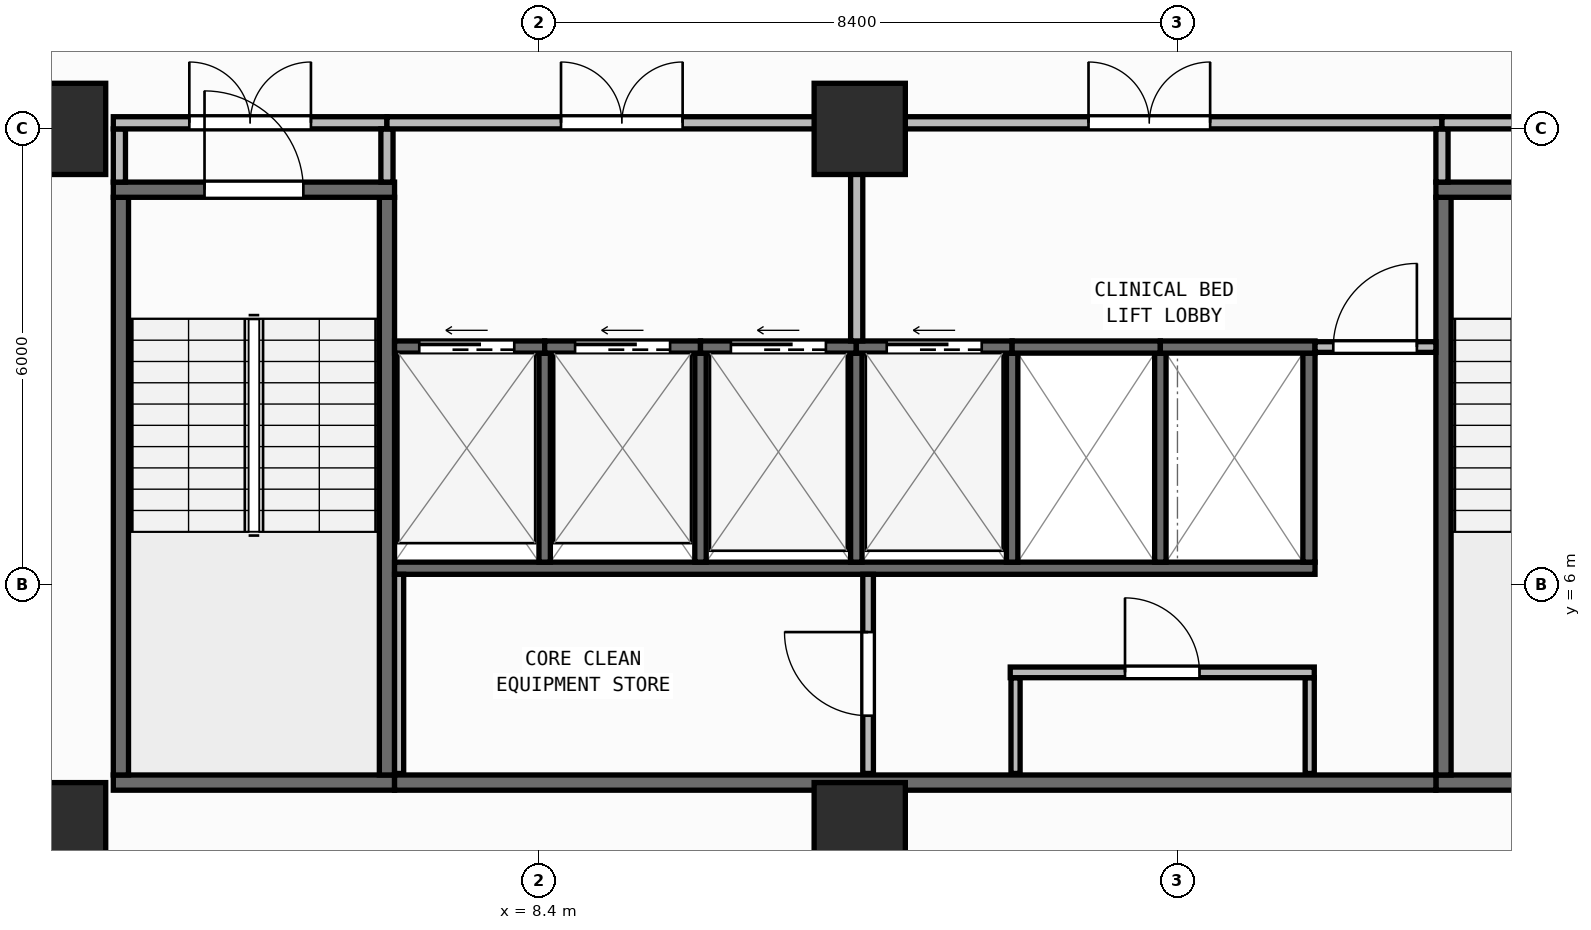
"""IFC4 building model, lengths in metres.
Left out: names, types, materials, properties, quantities, classifications, styles, units other than length and angle.
Written with IfcOpenShell. Run it as: python <this file> out.ifc"""

import sys

from ifc_helpers import new_model, si_unit, direction, frame, frame_2d, origin, origin_2d, place, context, subcontext, project, spatial, rectangle, extrude, element, fill, save


model = new_model("IFC4")
c1 = context("Model", 3, precision=1e-05, world=origin(), true_north=direction((0.0, 1.0)))
c2 = subcontext(c1, "Body", "Model", "MODEL_VIEW")
j1 = project(units=[si_unit("LENGTHUNIT", "METRE"), si_unit("PLANEANGLEUNIT", "RADIAN")], contexts=[c1])
p1 = place(None, origin())
s1 = spatial("IfcSite", under=j1, at=p1, CompositionType="ELEMENT")
p2 = place(p1, origin())
s2 = spatial("IfcBuilding", under=s1, at=p2, CompositionType="ELEMENT")
p3 = place(p2, frame((0.0, 0.0, 146.8)))
s3 = spatial("IfcBuildingStorey", under=s2, at=p3, CompositionType="ELEMENT", Elevation=146.8)
for number, where, z_axis, x_axis in (
    (1, (2.1, 2.8, 0.0), (0.0, 0.0, 1.0), (1.0, 0.0, 0.0)),
    (2, (12.62, 2.8, 0.0), (0.0, 0.0, 1.0), (1.0, 0.0, 0.0)),
    (3, (2.1, 12.0, 0.0), (0.0, 0.0, 1.0), (1.0, 0.0, 0.0)),
    (4, (12.62, 12.0, 0.0), (0.0, 0.0, 1.0), (1.0, 0.0, 0.0)),
):
    element("IfcColumn", number, at=place(p3, frame(where, z_axis=z_axis, x_axis=x_axis)), inside=s3, PredefinedType="COLUMN", context=c2, shape_type="SweptSolid", body=[
        extrude(rectangle(XDim=1.2, YDim=1.2, at=origin_2d()), origin(), (0.0, 0.0, 1.0), 3.95),
    ])
p4 = place(p3, frame((2.76, 0.173, 0.0), z_axis=(0.0, 0.0, 1.0), x_axis=(0.996857931723, 0.079210251617, 0.0)))
e5 = element("IfcWall", 5, at=p4, inside=s3, PredefinedType="STANDARD", context=c2, shape_type="SweptSolid", body=[
    extrude(rectangle(XDim=51.442, YDim=0.26, at=frame_2d((25.721, 0.0))), origin(), (0.0, 0.0, 1.0), 3.71),
])
p5 = place(p4, frame((24.521, 0.0, 0.9)))
e6 = element("IfcOpeningElement", 6, at=p5, cuts=e5, PredefinedType="OPENING", context=c2, shape_type="SweptSolid", body=[
    extrude(rectangle(XDim=2.4, YDim=1.65, at=frame_2d((1.2, 0.825))), frame((0.0, 0.14, 0.0), z_axis=(0.0, -1.0, 0.0), x_axis=(1.0, 0.0, 0.0)), (0.0, 0.0, 1.0), 0.28),
])
p6 = place(p3, frame((2.8, 3.4, 0.0), z_axis=(0.0, 0.0, 1.0), x_axis=(1.0, 0.0, 0.0)))
e7 = element("IfcWall", 7, at=p6, inside=s3, PredefinedType="SHEAR", context=c2, shape_type="SweptSolid", body=[
    extrude(rectangle(XDim=3.7, YDim=0.2, at=frame_2d((1.85, 0.0))), origin(), (0.0, 0.0, 1.0), 3.71),
])
for number, where, z_axis, x_axis in (
    (8, (2.9, 3.5, 0.0), (0.0, 0.0, 1.0), (0.0, 1.0, 0.0)),
    (9, (6.4, 3.5, 0.0), (0.0, 0.0, 1.0), (0.0, 1.0, 0.0)),
):
    element("IfcWall", number, at=place(p3, frame(where, z_axis=z_axis, x_axis=x_axis)), inside=s3, PredefinedType="SHEAR", context=c2, shape_type="SweptSolid", body=[
        extrude(rectangle(XDim=7.6, YDim=0.2, at=frame_2d((3.8, 0.0))), origin(), (0.0, 0.0, 1.0), 3.71),
    ])
p7 = place(p3, frame((2.8, 11.2, 0.0), z_axis=(0.0, 0.0, 1.0), x_axis=(1.0, 0.0, 0.0)))
e10 = element("IfcWall", 10, at=p7, inside=s3, PredefinedType="SHEAR", context=c2, shape_type="SweptSolid", body=[
    extrude(rectangle(XDim=3.7, YDim=0.2, at=frame_2d((1.85, 0.0))), origin(), (0.0, 0.0, 1.0), 3.71),
])
p8 = place(p7, frame((1.2, 0.0, 0.0)))
e11 = element("IfcOpeningElement", 11, at=p8, cuts=e10, PredefinedType="OPENING", context=c2, shape_type="SweptSolid", body=[
    extrude(rectangle(XDim=1.3, YDim=2.15, at=frame_2d((0.65, 1.075))), frame((0.0, 0.11, 0.0), z_axis=(0.0, -1.0, 0.0), x_axis=(1.0, 0.0, 0.0)), (0.0, 0.0, 1.0), 0.22),
])
p9 = place(p3, frame((20.2, 3.4, 0.0), z_axis=(0.0, 0.0, 1.0), x_axis=(1.0, 0.0, 0.0)))
e12 = element("IfcWall", 12, at=p9, inside=s3, PredefinedType="SHEAR", context=c2, shape_type="SweptSolid", body=[
    extrude(rectangle(XDim=3.7, YDim=0.2, at=frame_2d((1.85, 0.0))), origin(), (0.0, 0.0, 1.0), 3.71),
])
p10 = place(p3, frame((20.3, 3.5, 0.0), z_axis=(0.0, 0.0, 1.0), x_axis=(0.0, 1.0, 0.0)))
e13 = element("IfcWall", 13, at=p10, inside=s3, PredefinedType="SHEAR", context=c2, shape_type="SweptSolid", body=[
    extrude(rectangle(XDim=7.6, YDim=0.2, at=frame_2d((3.8, 0.0))), origin(), (0.0, 0.0, 1.0), 3.71),
])
p11 = place(p3, frame((20.2, 11.2, 0.0), z_axis=(0.0, 0.0, 1.0), x_axis=(1.0, 0.0, 0.0)))
e14 = element("IfcWall", 14, at=p11, inside=s3, PredefinedType="SHEAR", context=c2, shape_type="SweptSolid", body=[
    extrude(rectangle(XDim=3.7, YDim=0.2, at=frame_2d((1.85, 0.0))), origin(), (0.0, 0.0, 1.0), 3.71),
])
p12 = place(p11, frame((1.2, 0.0, 0.0)))
e15 = element("IfcOpeningElement", 15, at=p12, cuts=e14, PredefinedType="OPENING", context=c2, shape_type="SweptSolid", body=[
    extrude(rectangle(XDim=1.3, YDim=2.15, at=frame_2d((0.65, 1.075))), frame((0.0, 0.11, 0.0), z_axis=(0.0, -1.0, 0.0), x_axis=(1.0, 0.0, 0.0)), (0.0, 0.0, 1.0), 0.22),
])
p13 = place(p3, frame((6.5, 3.4, 0.0), z_axis=(0.0, 0.0, 1.0), x_axis=(1.0, 0.0, 0.0)))
e16 = element("IfcWall", 16, at=p13, inside=s3, PredefinedType="SHEAR", context=c2, shape_type="SweptSolid", body=[
    extrude(rectangle(XDim=13.7, YDim=0.2, at=frame_2d((6.85, 0.0))), origin(), (0.0, 0.0, 1.0), 3.71),
])
p14 = place(p3, frame((6.5, 6.22, 0.0), z_axis=(0.0, 0.0, 1.0), x_axis=(1.0, 0.0, 0.0)))
e17 = element("IfcWall", 17, at=p14, inside=s3, PredefinedType="SHEAR", context=c2, shape_type="SweptSolid", body=[
    extrude(rectangle(XDim=12.11, YDim=0.16, at=frame_2d((6.055, 0.0))), origin(), (0.0, 0.0, 1.0), 3.71),
])
p15 = place(p3, frame((18.53, 6.3, 0.0), z_axis=(0.0, 0.0, 1.0), x_axis=(0.0, 1.0, 0.0)))
e18 = element("IfcWall", 18, at=p15, inside=s3, PredefinedType="SHEAR", context=c2, shape_type="SweptSolid", body=[
    extrude(rectangle(XDim=2.75, YDim=0.16, at=frame_2d((1.375, 0.0))), origin(), (0.0, 0.0, 1.0), 3.71),
])
for number, where, z_axis, x_axis in (
    (19, (8.475, 6.3, 0.0), (0.0, 0.0, 1.0), (0.0, 1.0, 0.0)),
    (20, (10.525, 6.3, 0.0), (0.0, 0.0, 1.0), (0.0, 1.0, 0.0)),
    (21, (12.575, 6.3, 0.0), (0.0, 0.0, 1.0), (0.0, 1.0, 0.0)),
    (22, (14.625, 6.3, 0.0), (0.0, 0.0, 1.0), (0.0, 1.0, 0.0)),
    (23, (16.575, 6.3, 0.0), (0.0, 0.0, 1.0), (0.0, 1.0, 0.0)),
):
    element("IfcWall", number, at=place(p3, frame(where, z_axis=z_axis, x_axis=x_axis)), inside=s3, PredefinedType="SHEAR", context=c2, shape_type="SweptSolid", body=[
        extrude(rectangle(XDim=2.75, YDim=0.15, at=frame_2d((1.375, 0.0))), origin(), (0.0, 0.0, 1.0), 3.71),
    ])
p16 = place(p3, frame((6.5, 9.13, 0.0), z_axis=(0.0, 0.0, 1.0), x_axis=(1.0, 0.0, 0.0)))
e24 = element("IfcWall", 24, at=p16, inside=s3, PredefinedType="SHEAR", context=c2, shape_type="SweptSolid", body=[
    extrude(rectangle(XDim=1.975, YDim=0.16, at=frame_2d((0.988, 0.0))), origin(), (0.0, 0.0, 1.0), 3.71),
])
p17 = place(p16, frame((0.325, 0.0, 0.0)))
e25 = element("IfcOpeningElement", 25, at=p17, cuts=e24, PredefinedType="OPENING", context=c2, shape_type="SweptSolid", body=[
    extrude(rectangle(XDim=1.25, YDim=2.15, at=frame_2d((0.625, 1.075))), frame((0.0, 0.09, 0.0), z_axis=(0.0, -1.0, 0.0), x_axis=(1.0, 0.0, 0.0)), (0.0, 0.0, 1.0), 0.18),
])
p18 = place(p3, frame((8.475, 9.13, 0.0), z_axis=(0.0, 0.0, 1.0), x_axis=(1.0, 0.0, 0.0)))
e26 = element("IfcWall", 26, at=p18, inside=s3, PredefinedType="SHEAR", context=c2, shape_type="SweptSolid", body=[
    extrude(rectangle(XDim=2.05, YDim=0.16, at=frame_2d((1.025, 0.0))), origin(), (0.0, 0.0, 1.0), 3.71),
])
p19 = place(p18, frame((0.4, 0.0, 0.0)))
e27 = element("IfcOpeningElement", 27, at=p19, cuts=e26, PredefinedType="OPENING", context=c2, shape_type="SweptSolid", body=[
    extrude(rectangle(XDim=1.25, YDim=2.15, at=frame_2d((0.625, 1.075))), frame((0.0, 0.09, 0.0), z_axis=(0.0, -1.0, 0.0), x_axis=(1.0, 0.0, 0.0)), (0.0, 0.0, 1.0), 0.18),
])
p20 = place(p3, frame((10.525, 9.13, 0.0), z_axis=(0.0, 0.0, 1.0), x_axis=(1.0, 0.0, 0.0)))
e28 = element("IfcWall", 28, at=p20, inside=s3, PredefinedType="SHEAR", context=c2, shape_type="SweptSolid", body=[
    extrude(rectangle(XDim=2.05, YDim=0.16, at=frame_2d((1.025, 0.0))), origin(), (0.0, 0.0, 1.0), 3.71),
])
p21 = place(p20, frame((0.4, 0.0, 0.0)))
e29 = element("IfcOpeningElement", 29, at=p21, cuts=e28, PredefinedType="OPENING", context=c2, shape_type="SweptSolid", body=[
    extrude(rectangle(XDim=1.25, YDim=2.15, at=frame_2d((0.625, 1.075))), frame((0.0, 0.09, 0.0), z_axis=(0.0, -1.0, 0.0), x_axis=(1.0, 0.0, 0.0)), (0.0, 0.0, 1.0), 0.18),
])
p22 = place(p3, frame((12.575, 9.13, 0.0), z_axis=(0.0, 0.0, 1.0), x_axis=(1.0, 0.0, 0.0)))
e30 = element("IfcWall", 30, at=p22, inside=s3, PredefinedType="SHEAR", context=c2, shape_type="SweptSolid", body=[
    extrude(rectangle(XDim=2.05, YDim=0.16, at=frame_2d((1.025, 0.0))), origin(), (0.0, 0.0, 1.0), 3.71),
])
p23 = place(p22, frame((0.4, 0.0, 0.0)))
e31 = element("IfcOpeningElement", 31, at=p23, cuts=e30, PredefinedType="OPENING", context=c2, shape_type="SweptSolid", body=[
    extrude(rectangle(XDim=1.25, YDim=2.15, at=frame_2d((0.625, 1.075))), frame((0.0, 0.09, 0.0), z_axis=(0.0, -1.0, 0.0), x_axis=(1.0, 0.0, 0.0)), (0.0, 0.0, 1.0), 0.18),
])
p24 = place(p3, frame((14.625, 9.13, 0.0), z_axis=(0.0, 0.0, 1.0), x_axis=(1.0, 0.0, 0.0)))
e32 = element("IfcWall", 32, at=p24, inside=s3, PredefinedType="SHEAR", context=c2, shape_type="SweptSolid", body=[
    extrude(rectangle(XDim=1.95, YDim=0.16, at=frame_2d((0.975, 0.0))), origin(), (0.0, 0.0, 1.0), 3.71),
])
p25 = place(p3, frame((16.575, 9.13, 0.0), z_axis=(0.0, 0.0, 1.0), x_axis=(1.0, 0.0, 0.0)))
e33 = element("IfcWall", 33, at=p25, inside=s3, PredefinedType="SHEAR", context=c2, shape_type="SweptSolid", body=[
    extrude(rectangle(XDim=2.035, YDim=0.16, at=frame_2d((1.018, 0.0))), origin(), (0.0, 0.0, 1.0), 3.71),
])
p26 = place(p3, frame((6.56, 3.52, 0.0), z_axis=(0.0, 0.0, 1.0), x_axis=(0.0, 1.0, 0.0)))
e34 = element("IfcWall", 34, at=p26, inside=s3, PredefinedType="PARTITIONING", context=c2, shape_type="SweptSolid", body=[
    extrude(rectangle(XDim=2.62, YDim=0.12, at=frame_2d((1.31, 0.0))), origin(), (0.0, 0.0, 1.0), 3.71),
])
p27 = place(p3, frame((12.73, 3.52, 0.0), z_axis=(0.0, 0.0, 1.0), x_axis=(0.0, 1.0, 0.0)))
e35 = element("IfcWall", 35, at=p27, inside=s3, PredefinedType="PARTITIONING", context=c2, shape_type="SweptSolid", body=[
    extrude(rectangle(XDim=2.62, YDim=0.14, at=frame_2d((1.31, 0.0))), origin(), (0.0, 0.0, 1.0), 3.71),
])
p28 = place(p27, frame((0.76, 0.0, 0.0)))
e36 = element("IfcOpeningElement", 36, at=p28, cuts=e35, PredefinedType="OPENING", context=c2, shape_type="SweptSolid", body=[
    extrude(rectangle(XDim=1.1, YDim=2.1, at=frame_2d((0.55, 1.05))), frame((0.0, 0.08, 0.0), z_axis=(0.0, -1.0, 0.0), x_axis=(1.0, 0.0, 0.0)), (0.0, 0.0, 1.0), 0.16),
])
for number, where, z_axis, x_axis in (
    (37, (14.67, 3.52, 0.0), (0.0, 0.0, 1.0), (0.0, 1.0, 0.0)),
    (38, (18.54, 3.52, 0.0), (0.0, 0.0, 1.0), (0.0, 1.0, 0.0)),
):
    element("IfcWall", number, at=place(p3, frame(where, z_axis=z_axis, x_axis=x_axis)), inside=s3, PredefinedType="PARTITIONING", context=c2, shape_type="SweptSolid", body=[
        extrude(rectangle(XDim=1.26, YDim=0.12, at=frame_2d((0.63, 0.0))), origin(), (0.0, 0.0, 1.0), 3.71),
    ])
p29 = place(p3, frame((14.6, 4.85, 0.0), z_axis=(0.0, 0.0, 1.0), x_axis=(1.0, 0.0, 0.0)))
e39 = element("IfcWall", 39, at=p29, inside=s3, PredefinedType="PARTITIONING", context=c2, shape_type="SweptSolid", body=[
    extrude(rectangle(XDim=4.0, YDim=0.14, at=frame_2d((2.0, 0.0))), origin(), (0.0, 0.0, 1.0), 3.71),
])
p30 = place(p29, frame((1.51, 0.0, 0.0)))
e40 = element("IfcOpeningElement", 40, at=p30, cuts=e39, PredefinedType="OPENING", context=c2, shape_type="SweptSolid", body=[
    extrude(rectangle(XDim=0.98, YDim=2.1, at=frame_2d((0.49, 1.05))), frame((0.0, 0.08, 0.0), z_axis=(0.0, -1.0, 0.0), x_axis=(1.0, 0.0, 0.0)), (0.0, 0.0, 1.0), 0.16),
])
p31 = place(p3, frame((18.61, 9.13, 0.0), z_axis=(0.0, 0.0, 1.0), x_axis=(1.0, 0.0, 0.0)))
e41 = element("IfcWall", 41, at=p31, inside=s3, PredefinedType="PARTITIONING", context=c2, shape_type="SweptSolid", body=[
    extrude(rectangle(XDim=1.59, YDim=0.14, at=frame_2d((0.795, 0.0))), origin(), (0.0, 0.0, 1.0), 3.71),
])
p32 = place(p31, frame((0.24, 0.0, 0.0)))
e42 = element("IfcOpeningElement", 42, at=p32, cuts=e41, PredefinedType="OPENING", context=c2, shape_type="SweptSolid", body=[
    extrude(rectangle(XDim=1.1, YDim=2.1, at=frame_2d((0.55, 1.05))), frame((0.0, 0.08, 0.0), z_axis=(0.0, -1.0, 0.0), x_axis=(1.0, 0.0, 0.0)), (0.0, 0.0, 1.0), 0.16),
])
p33 = place(p3, frame((2.88, 11.3, 0.0), z_axis=(0.0, 0.0, 1.0), x_axis=(0.0, 1.0, 0.0)))
e43 = element("IfcWall", 43, at=p33, inside=s3, PredefinedType="PARTITIONING", context=c2, shape_type="SweptSolid", body=[
    extrude(rectangle(XDim=0.7, YDim=0.16, at=frame_2d((0.35, 0.0))), origin(), (0.0, 0.0, 1.0), 3.71),
])
p34 = place(p3, frame((2.8, 12.08, 0.0), z_axis=(0.0, 0.0, 1.0), x_axis=(1.0, 0.0, 0.0)))
e44 = element("IfcWall", 44, at=p34, inside=s3, PredefinedType="PARTITIONING", context=c2, shape_type="SweptSolid", body=[
    extrude(rectangle(XDim=3.6, YDim=0.16, at=frame_2d((1.8, 0.0))), origin(), (0.0, 0.0, 1.0), 3.083),
])
p35 = place(p34, frame((1.0, 0.0, 0.0)))
e45 = element("IfcOpeningElement", 45, at=p35, cuts=e44, PredefinedType="OPENING", context=c2, shape_type="SweptSolid", body=[
    extrude(rectangle(XDim=1.6, YDim=2.05, at=frame_2d((0.8, 1.025))), frame((0.0, 0.09, 0.0), z_axis=(0.0, -1.0, 0.0), x_axis=(1.0, 0.0, 0.0)), (0.0, 0.0, 1.0), 0.18),
])
p36 = place(p3, frame((6.4, 11.3, 0.0), z_axis=(0.0, 0.0, 1.0), x_axis=(0.0, 1.0, 0.0)))
e46 = element("IfcWall", 46, at=p36, inside=s3, PredefinedType="PARTITIONING", context=c2, shape_type="SweptSolid", body=[
    extrude(rectangle(XDim=0.7, YDim=0.16, at=frame_2d((0.35, 0.0))), origin(), (0.0, 0.0, 1.0), 3.71),
])
p37 = place(p3, frame((6.4, 12.08, 0.0), z_axis=(0.0, 0.0, 1.0), x_axis=(1.0, 0.0, 0.0)))
e47 = element("IfcWall", 47, at=p37, inside=s3, PredefinedType="PARTITIONING", context=c2, shape_type="SweptSolid", body=[
    extrude(rectangle(XDim=6.18, YDim=0.16, at=frame_2d((3.09, 0.0))), origin(), (0.0, 0.0, 1.0), 3.083),
])
p38 = place(p37, frame((2.29, 0.0, 0.0)))
e48 = element("IfcOpeningElement", 48, at=p38, cuts=e47, PredefinedType="OPENING", context=c2, shape_type="SweptSolid", body=[
    extrude(rectangle(XDim=1.6, YDim=2.05, at=frame_2d((0.8, 1.025))), frame((0.0, 0.09, 0.0), z_axis=(0.0, -1.0, 0.0), x_axis=(1.0, 0.0, 0.0)), (0.0, 0.0, 1.0), 0.18),
])
p39 = place(p3, frame((12.58, 9.21, 0.0), z_axis=(0.0, 0.0, 1.0), x_axis=(0.0, 1.0, 0.0)))
e49 = element("IfcWall", 49, at=p39, inside=s3, PredefinedType="PARTITIONING", context=c2, shape_type="SweptSolid", body=[
    extrude(rectangle(XDim=2.79, YDim=0.16, at=frame_2d((1.395, 0.0))), origin(), (0.0, 0.0, 1.0), 3.71),
])
p40 = place(p3, frame((12.58, 12.08, 0.0), z_axis=(0.0, 0.0, 1.0), x_axis=(1.0, 0.0, 0.0)))
e50 = element("IfcWall", 50, at=p40, inside=s3, PredefinedType="PARTITIONING", context=c2, shape_type="SweptSolid", body=[
    extrude(rectangle(XDim=7.7, YDim=0.16, at=frame_2d((3.85, 0.0))), origin(), (0.0, 0.0, 1.0), 3.083),
])
p41 = place(p40, frame((3.05, 0.0, 0.0)))
e51 = element("IfcOpeningElement", 51, at=p41, cuts=e50, PredefinedType="OPENING", context=c2, shape_type="SweptSolid", body=[
    extrude(rectangle(XDim=1.6, YDim=2.05, at=frame_2d((0.8, 1.025))), frame((0.0, 0.09, 0.0), z_axis=(0.0, -1.0, 0.0), x_axis=(1.0, 0.0, 0.0)), (0.0, 0.0, 1.0), 0.18),
])
p42 = place(p3, frame((20.28, 11.3, 0.0), z_axis=(0.0, 0.0, 1.0), x_axis=(0.0, 1.0, 0.0)))
e52 = element("IfcWall", 52, at=p42, inside=s3, PredefinedType="PARTITIONING", context=c2, shape_type="SweptSolid", body=[
    extrude(rectangle(XDim=0.7, YDim=0.16, at=frame_2d((0.35, 0.0))), origin(), (0.0, 0.0, 1.0), 3.71),
])
p43 = place(p3, frame((20.28, 12.08, 0.0), z_axis=(0.0, 0.0, 1.0), x_axis=(1.0, 0.0, 0.0)))
e53 = element("IfcWall", 53, at=p43, inside=s3, PredefinedType="PARTITIONING", context=c2, shape_type="SweptSolid", body=[
    extrude(rectangle(XDim=3.62, YDim=0.16, at=frame_2d((1.81, 0.0))), origin(), (0.0, 0.0, 1.0), 3.083),
])
p44 = place(p43, frame((1.01, 0.0, 0.0)))
e54 = element("IfcOpeningElement", 54, at=p44, cuts=e53, PredefinedType="OPENING", context=c2, shape_type="SweptSolid", body=[
    extrude(rectangle(XDim=1.6, YDim=2.05, at=frame_2d((0.8, 1.025))), frame((0.0, 0.09, 0.0), z_axis=(0.0, -1.0, 0.0), x_axis=(1.0, 0.0, 0.0)), (0.0, 0.0, 1.0), 0.18),
])
p45 = place(p8, origin())
e55 = element("IfcDoor", 55, at=p45, inside=s3, OperationType="SINGLE_SWING_LEFT", PredefinedType="DOOR", context=c2, shape_type="SweptSolid", body=[
    extrude(rectangle(XDim=1.3, YDim=2.15, at=frame_2d((0.65, 1.075))), frame((0.0, 0.025, 0.0), z_axis=(0.0, -1.0, 0.0), x_axis=(1.0, 0.0, 0.0)), (0.0, 0.0, 1.0), 0.05),
])
fill(e11, e55)
p46 = place(p17, origin())
e56 = element("IfcDoor", 56, at=p46, inside=s3, OperationType="SLIDING_TO_LEFT", PredefinedType="DOOR", context=c2, shape_type="SweptSolid", body=[
    extrude(rectangle(XDim=1.25, YDim=2.15, at=frame_2d((0.625, 1.075))), frame((0.0, 0.025, 0.0), z_axis=(0.0, -1.0, 0.0), x_axis=(1.0, 0.0, 0.0)), (0.0, 0.0, 1.0), 0.05),
])
fill(e25, e56)
p47 = place(p19, origin())
e57 = element("IfcDoor", 57, at=p47, inside=s3, OperationType="SLIDING_TO_LEFT", PredefinedType="DOOR", context=c2, shape_type="SweptSolid", body=[
    extrude(rectangle(XDim=1.25, YDim=2.15, at=frame_2d((0.625, 1.075))), frame((0.0, 0.025, 0.0), z_axis=(0.0, -1.0, 0.0), x_axis=(1.0, 0.0, 0.0)), (0.0, 0.0, 1.0), 0.05),
])
fill(e27, e57)
p48 = place(p21, origin())
e58 = element("IfcDoor", 58, at=p48, inside=s3, OperationType="SLIDING_TO_LEFT", PredefinedType="DOOR", context=c2, shape_type="SweptSolid", body=[
    extrude(rectangle(XDim=1.25, YDim=2.15, at=frame_2d((0.625, 1.075))), frame((0.0, 0.025, 0.0), z_axis=(0.0, -1.0, 0.0), x_axis=(1.0, 0.0, 0.0)), (0.0, 0.0, 1.0), 0.05),
])
fill(e29, e58)
p49 = place(p23, origin())
e59 = element("IfcDoor", 59, at=p49, inside=s3, OperationType="SLIDING_TO_LEFT", PredefinedType="DOOR", context=c2, shape_type="SweptSolid", body=[
    extrude(rectangle(XDim=1.25, YDim=2.15, at=frame_2d((0.625, 1.075))), frame((0.0, 0.025, 0.0), z_axis=(0.0, -1.0, 0.0), x_axis=(1.0, 0.0, 0.0)), (0.0, 0.0, 1.0), 0.05),
])
fill(e31, e59)
p50 = place(p28, origin())
e60 = element("IfcDoor", 60, at=p50, inside=s3, OperationType="SINGLE_SWING_RIGHT", PredefinedType="DOOR", context=c2, shape_type="SweptSolid", body=[
    extrude(rectangle(XDim=1.1, YDim=2.1, at=frame_2d((0.55, 1.05))), frame((0.0, 0.025, 0.0), z_axis=(0.0, -1.0, 0.0), x_axis=(1.0, 0.0, 0.0)), (0.0, 0.0, 1.0), 0.05),
])
fill(e36, e60)
p51 = place(p30, origin())
e61 = element("IfcDoor", 61, at=p51, inside=s3, OperationType="SINGLE_SWING_LEFT", PredefinedType="DOOR", context=c2, shape_type="SweptSolid", body=[
    extrude(rectangle(XDim=0.98, YDim=2.1, at=frame_2d((0.49, 1.05))), frame((0.0, 0.025, 0.0), z_axis=(0.0, -1.0, 0.0), x_axis=(1.0, 0.0, 0.0)), (0.0, 0.0, 1.0), 0.05),
])
fill(e40, e61)
p52 = place(p32, origin())
e62 = element("IfcDoor", 62, at=p52, inside=s3, OperationType="SINGLE_SWING_RIGHT", PredefinedType="DOOR", context=c2, shape_type="SweptSolid", body=[
    extrude(rectangle(XDim=1.1, YDim=2.1, at=frame_2d((0.55, 1.05))), frame((0.0, 0.025, 0.0), z_axis=(0.0, -1.0, 0.0), x_axis=(1.0, 0.0, 0.0)), (0.0, 0.0, 1.0), 0.05),
])
fill(e42, e62)
p53 = place(p35, origin())
e63 = element("IfcDoor", 63, at=p53, inside=s3, OperationType="DOUBLE_DOOR_SINGLE_SWING", PredefinedType="DOOR", context=c2, shape_type="SweptSolid", body=[
    extrude(rectangle(XDim=1.6, YDim=2.05, at=frame_2d((0.8, 1.025))), frame((0.0, 0.025, 0.0), z_axis=(0.0, -1.0, 0.0), x_axis=(1.0, 0.0, 0.0)), (0.0, 0.0, 1.0), 0.05),
])
fill(e45, e63)
p54 = place(p38, origin())
e64 = element("IfcDoor", 64, at=p54, inside=s3, OperationType="DOUBLE_DOOR_SINGLE_SWING", PredefinedType="DOOR", context=c2, shape_type="SweptSolid", body=[
    extrude(rectangle(XDim=1.6, YDim=2.05, at=frame_2d((0.8, 1.025))), frame((0.0, 0.025, 0.0), z_axis=(0.0, -1.0, 0.0), x_axis=(1.0, 0.0, 0.0)), (0.0, 0.0, 1.0), 0.05),
])
fill(e48, e64)
p55 = place(p41, origin())
e65 = element("IfcDoor", 65, at=p55, inside=s3, OperationType="DOUBLE_DOOR_SINGLE_SWING", PredefinedType="DOOR", context=c2, shape_type="SweptSolid", body=[
    extrude(rectangle(XDim=1.6, YDim=2.05, at=frame_2d((0.8, 1.025))), frame((0.0, 0.025, 0.0), z_axis=(0.0, -1.0, 0.0), x_axis=(1.0, 0.0, 0.0)), (0.0, 0.0, 1.0), 0.05),
])
fill(e51, e65)
save(model, sys.argv[1])
